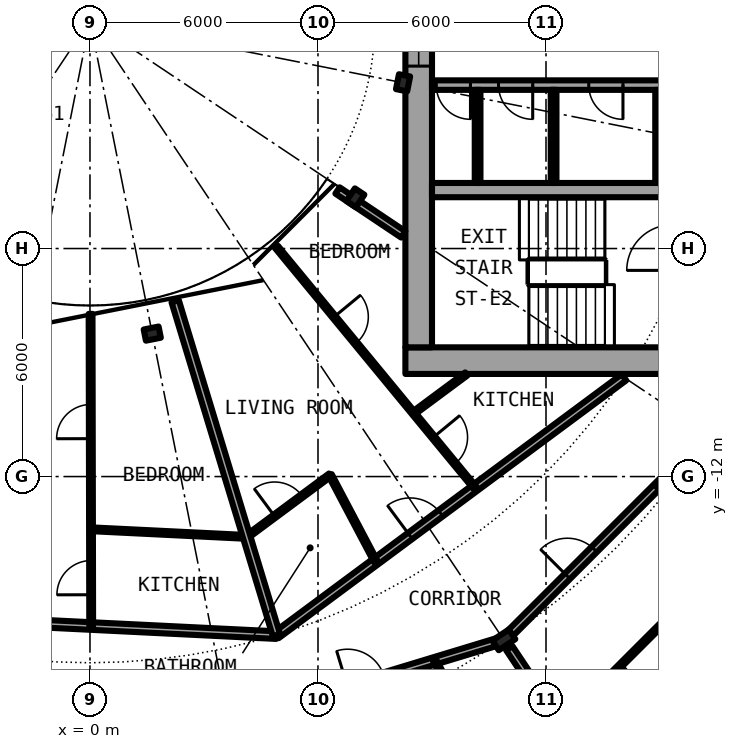
"""IFC4 building model, lengths in metres.
Left out: names, types, materials, properties, quantities, classifications, styles, units other than length and angle.
Written with IfcOpenShell. Run it as: python <this file> out.ifc"""

import sys

from ifc_helpers import new_model, si_unit, direction, frame, frame_2d, origin, origin_2d, place, context, subcontext, project, spatial, rectangle, i_section, extrude, element, fill, save


model = new_model("IFC4")
c1 = context("Model", 3, precision=1e-05, world=origin(), true_north=direction((0.0, 1.0)))
c2 = subcontext(c1, "Body", "Model", "MODEL_VIEW")
j1 = project(units=[si_unit("LENGTHUNIT", "METRE"), si_unit("PLANEANGLEUNIT", "RADIAN")], contexts=[c1])
p1 = place(None, origin())
s1 = spatial("IfcSite", under=j1, at=p1, CompositionType="ELEMENT")
p2 = place(p1, origin())
s2 = spatial("IfcBuilding", under=s1, at=p2, CompositionType="ELEMENT")
p3 = place(p2, frame((0.0, 0.0, 69.7)))
s3 = spatial("IfcBuildingStorey", under=s2, at=p3, CompositionType="ELEMENT", Elevation=69.7)
p4 = place(p3, frame((10.889, -16.297, 0.0), z_axis=(0.0, 0.0, 1.0), x_axis=(0.55557023302, -0.831469612303, 0.0)))
e1 = element("IfcColumn", 1, at=p4, inside=s3, PredefinedType="COLUMN", context=c2, shape_type="SweptSolid", body=[
    extrude(i_section(OverallWidth=0.306, OverallDepth=0.524, WebThickness=0.021, FlangeThickness=0.04, FilletRadius=0.027, at=origin_2d()), origin(), (0.0, 0.0, 1.0), 3.05),
])
for number, where, z_axis, x_axis in (
    (2, (1.639, -8.239, 0.0), (0.0, 0.0, 1.0), (0.195, -0.981, 0.0)),
    (3, (6.984, -4.667, 0.0), (0.0, 0.0, 1.0), (0.831, -0.556, 0.0)),
    (4, (8.239, -1.639, 0.0), (0.0, 0.0, 1.0), (0.981, -0.195, 0.0)),
):
    element("IfcColumn", number, at=place(p3, frame(where, z_axis=z_axis, x_axis=x_axis)), inside=s3, PredefinedType="COLUMN", context=c2, shape_type="SweptSolid", body=[
        extrude(i_section(OverallWidth=0.3, OverallDepth=0.4, WebThickness=0.013, FlangeThickness=0.024, FilletRadius=0.027, at=origin_2d()), origin(), (0.0, 0.0, 1.0), 3.05),
    ])
p5 = place(p3, frame((8.3, -8.95, 0.0), z_axis=(0.0, 0.0, 1.0), x_axis=(1.0, 0.0, 0.0)))
e5 = element("IfcWall", 5, at=p5, inside=s3, PredefinedType="SHEAR", context=c2, shape_type="SweptSolid", body=[
    extrude(rectangle(XDim=14.0, YDim=0.7, at=frame_2d((7.0, 0.0))), origin(), (0.0, 0.0, 1.0), 3.05),
])
p6 = place(p5, frame((11.575, 0.0, 0.0)))
e6 = element("IfcOpeningElement", 6, at=p6, cuts=e5, PredefinedType="OPENING", context=c2, shape_type="SweptSolid", body=[
    extrude(rectangle(XDim=1.2, YDim=2.3, at=frame_2d((0.6, 1.15))), frame((0.0, 0.36, 0.0), z_axis=(0.0, -1.0, 0.0), x_axis=(1.0, 0.0, 0.0)), (0.0, 0.0, 1.0), 0.72),
])
p7 = place(p3, frame((8.65, -8.6, 0.0), z_axis=(0.0, 0.0, 1.0), x_axis=(0.0, 1.0, 0.0)))
e7 = element("IfcWall", 7, at=p7, inside=s3, PredefinedType="SHEAR", context=c2, shape_type="SweptSolid", body=[
    extrude(rectangle(XDim=17.2, YDim=0.7, at=frame_2d((8.6, 0.0))), origin(), (0.0, 0.0, 1.0), 3.05),
])
p8 = place(p7, frame((7.4, 0.0, 0.1)))
e8 = element("IfcOpeningElement", 8, at=p8, cuts=e7, PredefinedType="OPENING", context=c2, shape_type="SweptSolid", body=[
    extrude(rectangle(XDim=2.4, YDim=2.2, at=frame_2d((1.2, 1.1))), frame((0.0, 0.36, 0.0), z_axis=(0.0, -1.0, 0.0), x_axis=(1.0, 0.0, 0.0)), (0.0, 0.0, 1.0), 0.72),
])
p9 = place(p3, frame((19.15, -1.7, 0.0), z_axis=(0.0, 0.0, 1.0), x_axis=(-1.0, 0.0, 0.0)))
e9 = element("IfcWall", 9, at=p9, inside=s3, PredefinedType="SHEAR", context=c2, shape_type="SweptSolid", body=[
    extrude(rectangle(XDim=10.15, YDim=0.25, at=frame_2d((5.075, 0.0))), origin(), (0.0, 0.0, 1.0), 3.05),
])
p10 = place(p9, frame((2.45, 0.0, 0.0)))
e10 = element("IfcOpeningElement", 10, at=p10, cuts=e9, PredefinedType="OPENING", context=c2, shape_type="SweptSolid", body=[
    extrude(rectangle(XDim=1.1, YDim=2.3, at=frame_2d((0.55, 1.15))), frame((0.0, 0.135, 0.0), z_axis=(0.0, -1.0, 0.0), x_axis=(1.0, 0.0, 0.0)), (0.0, 0.0, 1.0), 0.27),
])
p11 = place(p9, frame((9.137, 0.0, 0.0)))
e11 = element("IfcOpeningElement", 11, at=p11, cuts=e9, PredefinedType="OPENING", context=c2, shape_type="SweptSolid", body=[
    extrude(rectangle(XDim=0.9, YDim=2.3, at=frame_2d((0.45, 1.15))), frame((0.0, 0.135, 0.0), z_axis=(0.0, -1.0, 0.0), x_axis=(1.0, 0.0, 0.0)), (0.0, 0.0, 1.0), 0.27),
])
p12 = place(p9, frame((7.5, 0.0, 0.0)))
e12 = element("IfcOpeningElement", 12, at=p12, cuts=e9, PredefinedType="OPENING", context=c2, shape_type="SweptSolid", body=[
    extrude(rectangle(XDim=0.9, YDim=2.3, at=frame_2d((0.45, 1.15))), frame((0.0, 0.135, 0.0), z_axis=(0.0, -1.0, 0.0), x_axis=(1.0, 0.0, 0.0)), (0.0, 0.0, 1.0), 0.27),
])
p13 = place(p9, frame((5.125, 0.0, 0.0)))
e13 = element("IfcOpeningElement", 13, at=p13, cuts=e9, PredefinedType="OPENING", context=c2, shape_type="SweptSolid", body=[
    extrude(rectangle(XDim=0.9, YDim=2.3, at=frame_2d((0.45, 1.15))), frame((0.0, 0.135, 0.0), z_axis=(0.0, -1.0, 0.0), x_axis=(1.0, 0.0, 0.0)), (0.0, 0.0, 1.0), 0.27),
])
p14 = place(p9, frame((0.413, 0.0, 0.0)))
e14 = element("IfcOpeningElement", 14, at=p14, cuts=e9, PredefinedType="OPENING", context=c2, shape_type="SweptSolid", body=[
    extrude(rectangle(XDim=0.9, YDim=2.3, at=frame_2d((0.45, 1.15))), frame((0.0, 0.135, 0.0), z_axis=(0.0, -1.0, 0.0), x_axis=(1.0, 0.0, 0.0)), (0.0, 0.0, 1.0), 0.27),
])
p15 = place(p3, frame((9.0, -4.462, 0.0), z_axis=(0.0, 0.0, 1.0), x_axis=(1.0, 0.0, 0.0)))
e15 = element("IfcWall", 15, at=p15, inside=s3, PredefinedType="SHEAR", context=c2, shape_type="SweptSolid", body=[
    extrude(rectangle(XDim=10.15, YDim=0.375, at=frame_2d((5.075, 0.0))), origin(), (0.0, 0.0, 1.0), 3.05),
])
p16 = place(p3, frame((15.0, -1.825, 0.0), z_axis=(0.0, 0.0, 1.0), x_axis=(0.0, -1.0, 0.0)))
e16 = element("IfcWall", 16, at=p16, inside=s3, PredefinedType="SOLIDWALL", context=c2, shape_type="SweptSolid", body=[
    extrude(rectangle(XDim=2.45, YDim=0.25, at=frame_2d((1.225, 0.0))), origin(), (0.0, 0.0, 1.0), 2.7),
])
for number, where, z_axis, x_axis in (
    (17, (10.2, -1.825, 0.0), (0.0, 0.0, 1.0), (0.0, -1.0, 0.0)),
    (18, (12.2, -1.825, 0.0), (0.0, 0.0, 1.0), (0.0, -1.0, 0.0)),
):
    element("IfcWall", number, at=place(p3, frame(where, z_axis=z_axis, x_axis=x_axis)), inside=s3, PredefinedType="PARTITIONING", context=c2, shape_type="SweptSolid", body=[
        extrude(rectangle(XDim=2.45, YDim=0.15, at=frame_2d((1.225, 0.0))), origin(), (0.0, 0.0, 1.0), 2.7),
    ])
p17 = place(p3, frame((12.386, -18.545, 0.0), z_axis=(0.0, 0.0, 1.0), x_axis=(0.707106781187, 0.707106781187, 0.0)))
e19 = element("IfcWall", 19, at=p17, inside=s3, PredefinedType="PARTITIONING", context=c2, shape_type="SweptSolid", body=[
    extrude(rectangle(XDim=4.351, YDim=0.1, at=frame_2d((2.176, 0.0))), origin(), (0.0, 0.0, 1.0), 2.7),
])
p18 = place(p17, frame((0.644, 0.0, 0.0)))
e20 = element("IfcOpeningElement", 20, at=p18, cuts=e19, PredefinedType="OPENING", context=c2, shape_type="SweptSolid", body=[
    extrude(rectangle(XDim=0.9, YDim=2.3, at=frame_2d((0.45, 1.15))), frame((0.0, 0.06, 0.0), z_axis=(0.0, -1.0, 0.0), x_axis=(1.0, 0.0, 0.0)), (0.0, 0.0, 1.0), 0.12),
])
p19 = place(p3, frame((11.0, -16.186, 0.0), z_axis=(0.0, 0.0, 1.0), x_axis=(0.707106781187, 0.707106781187, 0.0)))
e21 = element("IfcWall", 21, at=p19, inside=s3, PredefinedType="PARTITIONING", context=c2, shape_type="SweptSolid", body=[
    extrude(rectangle(XDim=7.334, YDim=0.2, at=frame_2d((3.667, 0.0))), origin(), (0.0, 0.0, 1.0), 2.38),
])
p20 = place(p19, frame((2.211, 0.0, 0.0)))
e22 = element("IfcOpeningElement", 22, at=p20, cuts=e21, PredefinedType="OPENING", context=c2, shape_type="SweptSolid", body=[
    extrude(rectangle(XDim=1.0, YDim=2.3, at=frame_2d((0.5, 1.15))), frame((0.0, 0.11, 0.0), z_axis=(0.0, -1.0, 0.0), x_axis=(1.0, 0.0, 0.0)), (0.0, 0.0, 1.0), 0.22),
])
p21 = place(p3, frame((0.0, -19.6, 0.0), z_axis=(0.0, 0.0, 1.0), x_axis=(0.956932298225, 0.290311172044, 0.0)))
e23 = element("IfcWall", 23, at=p21, inside=s3, PredefinedType="PARTITIONING", context=c2, shape_type="SweptSolid", body=[
    extrude(rectangle(XDim=11.219, YDim=0.2, at=frame_2d((5.61, 0.0))), origin(), (0.0, 0.0, 1.0), 2.38),
])
p22 = place(p21, frame((7.086, 0.0, 0.0)))
e24 = element("IfcOpeningElement", 24, at=p22, cuts=e23, PredefinedType="OPENING", context=c2, shape_type="SweptSolid", body=[
    extrude(rectangle(XDim=1.0, YDim=2.3, at=frame_2d((0.5, 1.15))), frame((0.0, 0.11, 0.0), z_axis=(0.0, -1.0, 0.0), x_axis=(1.0, 0.0, 0.0)), (0.0, 0.0, 1.0), 0.22),
])
p23 = place(p3, frame((-6.469, -15.614, 0.0), z_axis=(0.0, 0.0, 1.0), x_axis=(0.998798520108, -0.049005267363, 0.0)))
e25 = element("IfcWall", 25, at=p23, inside=s3, PredefinedType="PARTITIONING", context=c2, shape_type="SweptSolid", body=[
    extrude(rectangle(XDim=11.389, YDim=0.2, at=frame_2d((5.694, 0.0))), origin(), (0.0, 0.0, 1.0), 2.7),
])
p24 = place(p23, frame((4.383, 0.0, 0.0)))
e26 = element("IfcOpeningElement", 26, at=p24, cuts=e25, PredefinedType="OPENING", context=c2, shape_type="SweptSolid", body=[
    extrude(rectangle(XDim=1.0, YDim=2.3, at=frame_2d((0.5, 1.15))), frame((0.0, 0.11, 0.0), z_axis=(0.0, -1.0, 0.0), x_axis=(1.0, 0.0, 0.0)), (0.0, 0.0, 1.0), 0.22),
])
p25 = place(p3, frame((4.906, -16.172, 0.0), z_axis=(0.0, 0.0, 1.0), x_axis=(0.803204584823, 0.59570327758, 0.0)))
e27 = element("IfcWall", 27, at=p25, inside=s3, PredefinedType="PARTITIONING", context=c2, shape_type="SweptSolid", body=[
    extrude(rectangle(XDim=11.387, YDim=0.2, at=frame_2d((5.693, 0.0))), origin(), (0.0, 0.0, 1.0), 2.7),
])
p26 = place(p25, frame((4.38, 0.0, 0.0)))
e28 = element("IfcOpeningElement", 28, at=p26, cuts=e27, PredefinedType="OPENING", context=c2, shape_type="SweptSolid", body=[
    extrude(rectangle(XDim=1.0, YDim=2.3, at=frame_2d((0.5, 1.15))), frame((0.0, 0.11, 0.0), z_axis=(0.0, -1.0, 0.0), x_axis=(1.0, 0.0, 0.0)), (0.0, 0.0, 1.0), 0.22),
])
p27 = place(p3, frame((0.03, -13.387, 0.0), z_axis=(0.0, 0.0, 1.0), x_axis=(0.998798386358, -0.049007993321, 0.0)))
e29 = element("IfcWall", 29, at=p27, inside=s3, PredefinedType="PARTITIONING", context=c2, shape_type="SweptSolid", body=[
    extrude(rectangle(XDim=4.1, YDim=0.1, at=frame_2d((2.05, 0.0))), origin(), (0.0, 0.0, 1.0), 2.7),
])
p28 = place(p3, frame((4.123, -13.589, 0.0), z_axis=(0.0, 0.0, 1.0), x_axis=(0.803128348509, 0.595806055542, 0.0)))
e30 = element("IfcWall", 30, at=p28, inside=s3, PredefinedType="PARTITIONING", context=c2, shape_type="SweptSolid", body=[
    extrude(rectangle(XDim=2.734, YDim=0.1, at=frame_2d((1.367, 0.0))), origin(), (0.0, 0.0, 1.0), 2.7),
])
p29 = place(p28, frame((0.916, 0.0, 0.0)))
e31 = element("IfcOpeningElement", 31, at=p29, cuts=e30, PredefinedType="OPENING", context=c2, shape_type="SweptSolid", body=[
    extrude(rectangle(XDim=0.9, YDim=2.3, at=frame_2d((0.45, 1.15))), frame((0.0, 0.06, 0.0), z_axis=(0.0, -1.0, 0.0), x_axis=(1.0, 0.0, 0.0)), (0.0, 0.0, 1.0), 0.12),
])
p30 = place(p3, frame((8.513, -10.332, 0.0), z_axis=(0.0, 0.0, 1.0), x_axis=(0.803135014325, 0.595797070121, 0.0)))
e32 = element("IfcWall", 32, at=p30, inside=s3, PredefinedType="PARTITIONING", context=c2, shape_type="SweptSolid", body=[
    extrude(rectangle(XDim=1.732, YDim=0.1, at=frame_2d((0.866, 0.0))), origin(), (0.0, 0.0, 1.0), 2.7),
])
p31 = place(p3, frame((6.513, -4.472, 0.0), z_axis=(0.0, 0.0, 1.0), x_axis=(0.831382204863, -0.555701025225, 0.0)))
e33 = element("IfcWall", 33, at=p31, inside=s3, PredefinedType="PARTITIONING", context=c2, shape_type="SweptSolid", body=[
    extrude(rectangle(XDim=2.082, YDim=0.2, at=frame_2d((1.041, 0.0))), origin(), (0.0, 0.0, 1.0), 2.7),
])
p32 = place(p3, frame((0.032, -15.933, 0.0), z_axis=(0.0, 0.0, 1.0), x_axis=(-0.0019321625, 0.999998133372, 0.0)))
e34 = element("IfcWall", 34, at=p32, inside=s3, PredefinedType="PARTITIONING", context=c2, shape_type="SweptSolid", body=[
    extrude(rectangle(XDim=8.213, YDim=0.1, at=frame_2d((4.106, 0.0))), origin(), (0.0, 0.0, 1.0), 2.7),
])
p33 = place(p32, frame((0.823, 0.0, 0.0)))
e35 = element("IfcOpeningElement", 35, at=p33, cuts=e34, PredefinedType="OPENING", context=c2, shape_type="SweptSolid", body=[
    extrude(rectangle(XDim=0.9, YDim=2.3, at=frame_2d((0.45, 1.15))), frame((0.0, 0.06, 0.0), z_axis=(0.0, -1.0, 0.0), x_axis=(1.0, 0.0, 0.0)), (0.0, 0.0, 1.0), 0.12),
])
p34 = place(p32, frame((4.93, 0.0, 0.0)))
e36 = element("IfcOpeningElement", 36, at=p34, cuts=e34, PredefinedType="OPENING", context=c2, shape_type="SweptSolid", body=[
    extrude(rectangle(XDim=0.9, YDim=2.3, at=frame_2d((0.45, 1.15))), frame((0.0, 0.06, 0.0), z_axis=(0.0, -1.0, 0.0), x_axis=(1.0, 0.0, 0.0)), (0.0, 0.0, 1.0), 0.12),
])
p35 = place(p3, frame((2.242, -7.388, 0.0), z_axis=(0.0, 0.0, 1.0), x_axis=(0.290225889812, -0.956958166736, 0.0)))
e37 = element("IfcWall", 37, at=p35, inside=s3, PredefinedType="PARTITIONING", context=c2, shape_type="SweptSolid", body=[
    extrude(rectangle(XDim=9.179, YDim=0.2, at=frame_2d((4.59, 0.0))), origin(), (0.0, 0.0, 1.0), 2.7),
])
p36 = place(p3, frame((4.908, -5.959, 0.0), z_axis=(0.0, 0.0, 1.0), x_axis=(0.636105207978, -0.771602335652, 0.0)))
e38 = element("IfcWall", 38, at=p36, inside=s3, PredefinedType="PARTITIONING", context=c2, shape_type="SweptSolid", body=[
    extrude(rectangle(XDim=8.213, YDim=0.1, at=frame_2d((4.106, 0.0))), origin(), (0.0, 0.0, 1.0), 2.7),
])
p37 = place(p36, frame((6.49, 0.0, 0.0)))
e39 = element("IfcOpeningElement", 39, at=p37, cuts=e38, PredefinedType="OPENING", context=c2, shape_type="SweptSolid", body=[
    extrude(rectangle(XDim=0.9, YDim=2.3, at=frame_2d((0.45, 1.15))), frame((0.0, 0.06, 0.0), z_axis=(0.0, -1.0, 0.0), x_axis=(1.0, 0.0, 0.0)), (0.0, 0.0, 1.0), 0.12),
])
p38 = place(p36, frame((2.384, 0.0, 0.0)))
e40 = element("IfcOpeningElement", 40, at=p38, cuts=e38, PredefinedType="OPENING", context=c2, shape_type="SweptSolid", body=[
    extrude(rectangle(XDim=0.9, YDim=2.3, at=frame_2d((0.45, 1.15))), frame((0.0, 0.06, 0.0), z_axis=(0.0, -1.0, 0.0), x_axis=(1.0, 0.0, 0.0)), (0.0, 0.0, 1.0), 0.12),
])
p39 = place(p3, frame((6.318, -11.96, 0.0), z_axis=(0.0, 0.0, 1.0), x_axis=(0.467001992543, -0.884256263173, 0.0)))
e41 = element("IfcWall", 41, at=p39, inside=s3, PredefinedType="PARTITIONING", context=c2, shape_type="SweptSolid", body=[
    extrude(rectangle(XDim=2.572, YDim=0.1, at=frame_2d((1.286, 0.0))), origin(), (0.0, 0.0, 1.0), 2.7),
])
p40 = place(p3, frame((9.074, -16.847, 0.0), z_axis=(0.0, 0.0, 1.0), x_axis=(0.474160570331, -0.880438387136, 0.0)))
e42 = element("IfcWall", 42, at=p40, inside=s3, PredefinedType="PARTITIONING", context=c2, shape_type="SweptSolid", body=[
    extrude(rectangle(XDim=2.636, YDim=0.1, at=frame_2d((1.318, 0.0))), origin(), (0.0, 0.0, 1.0), 2.7),
])
p41 = place(p40, frame((0.868, 0.0, 0.0)))
e43 = element("IfcOpeningElement", 43, at=p41, cuts=e42, PredefinedType="OPENING", context=c2, shape_type="SweptSolid", body=[
    extrude(rectangle(XDim=0.9, YDim=2.3, at=frame_2d((0.45, 1.15))), frame((0.0, 0.06, 0.0), z_axis=(0.0, -1.0, 0.0), x_axis=(1.0, 0.0, 0.0)), (0.0, 0.0, 1.0), 0.12),
])
p42 = place(p3, frame((11.034, -16.515, 0.0), z_axis=(0.0, 0.0, 1.0), x_axis=(0.555701298605, -0.831382022135, 0.0)))
e44 = element("IfcWall", 44, at=p42, inside=s3, PredefinedType="PARTITIONING", context=c2, shape_type="SweptSolid", body=[
    extrude(rectangle(XDim=7.313, YDim=0.2, at=frame_2d((3.657, 0.0))), origin(), (0.0, 0.0, 1.0), 2.7),
])
p43 = place(p3, frame((13.927, -17.004, 0.0), z_axis=(0.0, 0.0, 1.0), x_axis=(0.633774976367, -0.773517471898, 0.0)))
e45 = element("IfcWall", 45, at=p43, inside=s3, PredefinedType="PARTITIONING", context=c2, shape_type="SweptSolid", body=[
    extrude(rectangle(XDim=5.196, YDim=0.1, at=frame_2d((2.598, 0.0))), origin(), (0.0, 0.0, 1.0), 2.7),
])
p44 = place(p3, frame((14.945, -12.241, 0.0), z_axis=(0.0, 0.0, 1.0), x_axis=(0.77367517848, -0.633582447834, 0.0)))
e46 = element("IfcWall", 46, at=p44, inside=s3, PredefinedType="PARTITIONING", context=c2, shape_type="SweptSolid", body=[
    extrude(rectangle(XDim=2.661, YDim=0.1, at=frame_2d((1.331, 0.0))), origin(), (0.0, 0.0, 1.0), 2.7),
])
p45 = place(p44, frame((0.881, 0.0, 0.0)))
e47 = element("IfcOpeningElement", 47, at=p45, cuts=e46, PredefinedType="OPENING", context=c2, shape_type="SweptSolid", body=[
    extrude(rectangle(XDim=0.9, YDim=2.3, at=frame_2d((0.45, 1.15))), frame((0.0, 0.06, 0.0), z_axis=(0.0, -1.0, 0.0), x_axis=(1.0, 0.0, 0.0)), (0.0, 0.0, 1.0), 0.12),
])
p46 = place(p11, origin())
e48 = element("IfcDoor", 48, at=p46, inside=s3, OperationType="SINGLE_SWING_LEFT", PredefinedType="DOOR", context=c2, shape_type="SweptSolid", body=[
    extrude(rectangle(XDim=0.9, YDim=2.3, at=frame_2d((0.45, 1.15))), frame((0.0, 0.025, 0.0), z_axis=(0.0, -1.0, 0.0), x_axis=(1.0, 0.0, 0.0)), (0.0, 0.0, 1.0), 0.05),
])
fill(e11, e48)
p47 = place(p12, origin())
e49 = element("IfcDoor", 49, at=p47, inside=s3, OperationType="SINGLE_SWING_LEFT", PredefinedType="DOOR", context=c2, shape_type="SweptSolid", body=[
    extrude(rectangle(XDim=0.9, YDim=2.3, at=frame_2d((0.45, 1.15))), frame((0.0, 0.025, 0.0), z_axis=(0.0, -1.0, 0.0), x_axis=(1.0, 0.0, 0.0)), (0.0, 0.0, 1.0), 0.05),
])
fill(e12, e49)
p48 = place(p13, origin())
e50 = element("IfcDoor", 50, at=p48, inside=s3, OperationType="SINGLE_SWING_LEFT", PredefinedType="DOOR", context=c2, shape_type="SweptSolid", body=[
    extrude(rectangle(XDim=0.9, YDim=2.3, at=frame_2d((0.45, 1.15))), frame((0.0, 0.025, 0.0), z_axis=(0.0, -1.0, 0.0), x_axis=(1.0, 0.0, 0.0)), (0.0, 0.0, 1.0), 0.05),
])
fill(e13, e50)
p49 = place(p8, origin())
e51 = element("IfcWindow", 51, at=p49, inside=s3, PartitioningType="SINGLE_PANEL", PredefinedType="WINDOW", context=c2, shape_type="SweptSolid", body=[
    extrude(rectangle(XDim=2.4, YDim=2.2, at=frame_2d((1.2, 1.1))), frame((0.0, 0.03, 0.0), z_axis=(0.0, -1.0, 0.0), x_axis=(1.0, 0.0, 0.0)), (0.0, 0.0, 1.0), 0.06),
])
fill(e8, e51)
p50 = place(p20, origin())
e52 = element("IfcDoor", 52, at=p50, inside=s3, OperationType="SINGLE_SWING_LEFT", PredefinedType="DOOR", context=c2, shape_type="SweptSolid", body=[
    extrude(rectangle(XDim=1.0, YDim=2.3, at=frame_2d((0.5, 1.15))), frame((0.0, 0.025, 0.0), z_axis=(0.0, -1.0, 0.0), x_axis=(1.0, 0.0, 0.0)), (0.0, 0.0, 1.0), 0.05),
])
fill(e22, e52)
p51 = place(p33, origin())
e53 = element("IfcDoor", 53, at=p51, inside=s3, OperationType="SINGLE_SWING_LEFT", PredefinedType="DOOR", context=c2, shape_type="SweptSolid", body=[
    extrude(rectangle(XDim=0.9, YDim=2.3, at=frame_2d((0.45, 1.15))), frame((0.0, 0.025, 0.0), z_axis=(0.0, -1.0, 0.0), x_axis=(1.0, 0.0, 0.0)), (0.0, 0.0, 1.0), 0.05),
])
fill(e35, e53)
p52 = place(p34, origin())
e54 = element("IfcDoor", 54, at=p52, inside=s3, OperationType="SINGLE_SWING_RIGHT", PredefinedType="DOOR", context=c2, shape_type="SweptSolid", body=[
    extrude(rectangle(XDim=0.9, YDim=2.3, at=frame_2d((0.45, 1.15))), frame((0.0, 0.025, 0.0), z_axis=(0.0, -1.0, 0.0), x_axis=(1.0, 0.0, 0.0)), (0.0, 0.0, 1.0), 0.05),
])
fill(e36, e54)
p53 = place(p26, origin())
e55 = element("IfcDoor", 55, at=p53, inside=s3, OperationType="SINGLE_SWING_LEFT", PredefinedType="DOOR", context=c2, shape_type="SweptSolid", body=[
    extrude(rectangle(XDim=1.0, YDim=2.3, at=frame_2d((0.5, 1.15))), frame((0.0, 0.025, 0.0), z_axis=(0.0, -1.0, 0.0), x_axis=(1.0, 0.0, 0.0)), (0.0, 0.0, 1.0), 0.05),
])
fill(e28, e55)
p54 = place(p29, origin())
e56 = element("IfcDoor", 56, at=p54, inside=s3, OperationType="SINGLE_SWING_LEFT", PredefinedType="DOOR", context=c2, shape_type="SweptSolid", body=[
    extrude(rectangle(XDim=0.9, YDim=2.3, at=frame_2d((0.45, 1.15))), frame((0.0, 0.025, 0.0), z_axis=(0.0, -1.0, 0.0), x_axis=(1.0, 0.0, 0.0)), (0.0, 0.0, 1.0), 0.05),
])
fill(e31, e56)
p55 = place(p37, origin())
e57 = element("IfcDoor", 57, at=p55, inside=s3, OperationType="SINGLE_SWING_RIGHT", PredefinedType="DOOR", context=c2, shape_type="SweptSolid", body=[
    extrude(rectangle(XDim=0.9, YDim=2.3, at=frame_2d((0.45, 1.15))), frame((0.0, 0.025, 0.0), z_axis=(0.0, -1.0, 0.0), x_axis=(1.0, 0.0, 0.0)), (0.0, 0.0, 1.0), 0.05),
])
fill(e39, e57)
p56 = place(p38, origin())
e58 = element("IfcDoor", 58, at=p56, inside=s3, OperationType="SINGLE_SWING_LEFT", PredefinedType="DOOR", context=c2, shape_type="SweptSolid", body=[
    extrude(rectangle(XDim=0.9, YDim=2.3, at=frame_2d((0.45, 1.15))), frame((0.0, 0.025, 0.0), z_axis=(0.0, -1.0, 0.0), x_axis=(1.0, 0.0, 0.0)), (0.0, 0.0, 1.0), 0.05),
])
fill(e40, e58)
save(model, sys.argv[1])
